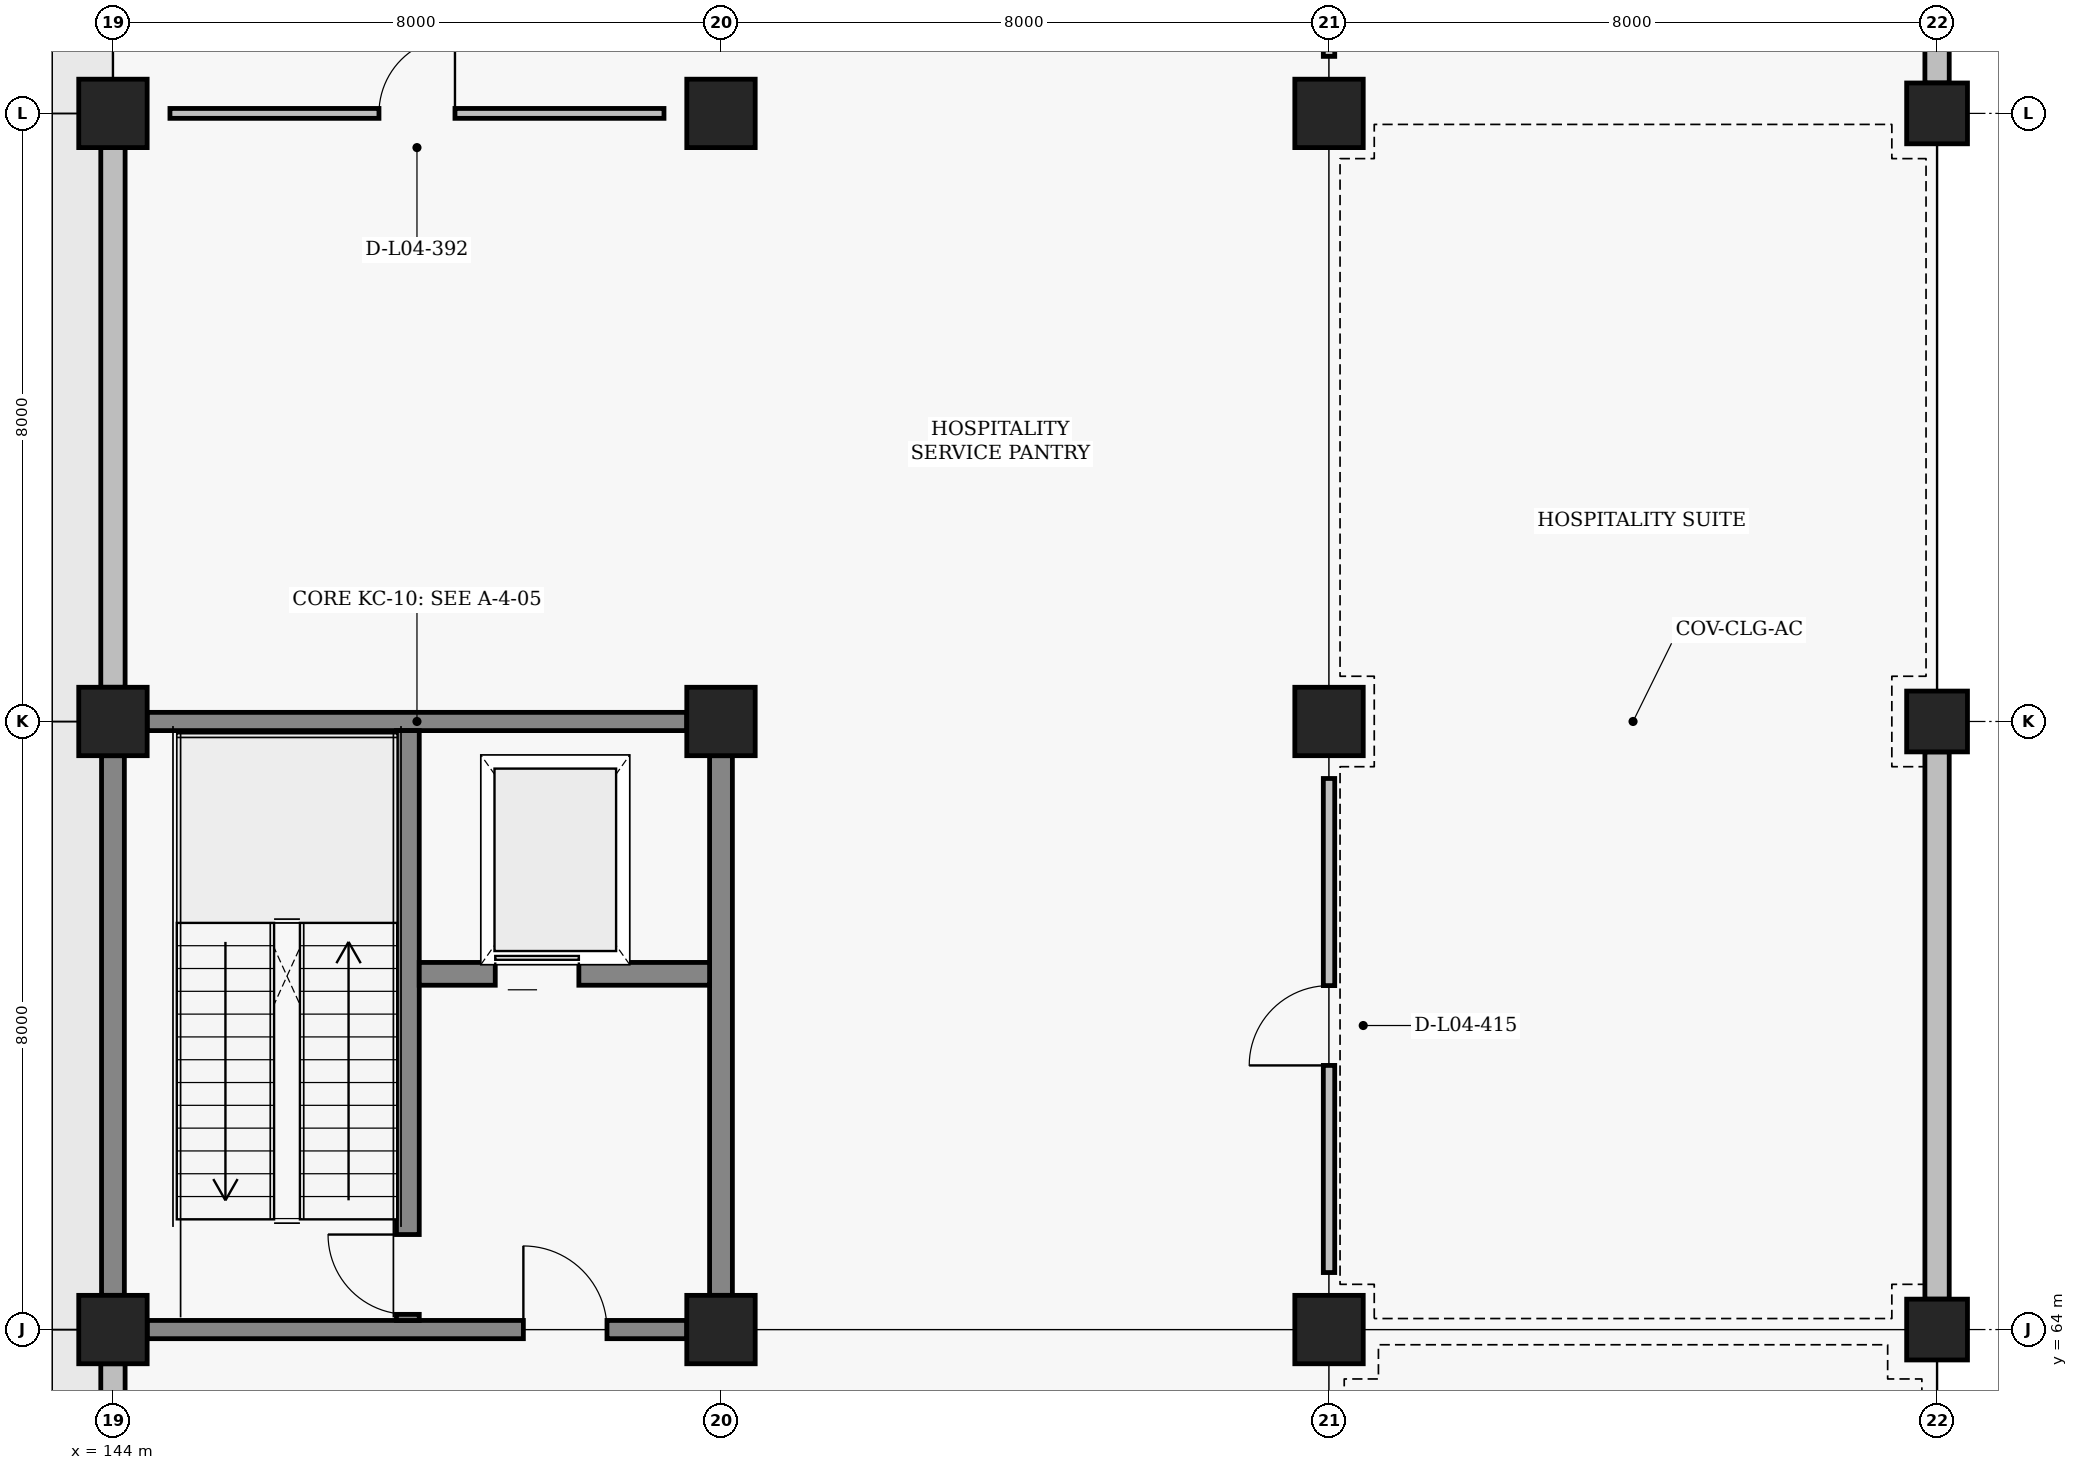
"""IFC4 building model, lengths in metres.
Left out: names, types, materials, properties, quantities, classifications, styles, units other than length and angle.
Written with IfcOpenShell. Run it as: python <this file> out.ifc"""

import sys

from ifc_helpers import new_model, si_unit, direction, frame, frame_2d, origin, origin_2d, place, context, subcontext, project, spatial, rectangle, extrude, element, fill, save


model = new_model("IFC4")
c1 = context("Model", 3, precision=1e-05, world=origin(), true_north=direction((0.0, 1.0)))
c2 = subcontext(c1, "Body", "Model", "MODEL_VIEW")
j1 = project(units=[si_unit("LENGTHUNIT", "METRE"), si_unit("PLANEANGLEUNIT", "RADIAN")], contexts=[c1])
p1 = place(None, origin())
s1 = spatial("IfcSite", under=j1, at=p1, CompositionType="ELEMENT")
p2 = place(p1, origin())
s2 = spatial("IfcBuilding", under=s1, at=p2, CompositionType="ELEMENT")
p3 = place(p2, frame((0.0, 0.0, 14.4)))
s3 = spatial("IfcBuildingStorey", under=s2, at=p3, CompositionType="ELEMENT", Elevation=14.4)
for number, where, z_axis, x_axis in (
    (1, (144.0, 64.0, 0.0), (0.0, 0.0, 1.0), (1.0, 0.0, 0.0)),
    (2, (144.0, 72.0, 0.0), (0.0, 0.0, 1.0), (1.0, 0.0, 0.0)),
    (3, (144.0, 80.0, 0.0), (0.0, 0.0, 1.0), (1.0, 0.0, 0.0)),
    (4, (152.0, 64.0, 0.0), (0.0, 0.0, 1.0), (1.0, 0.0, 0.0)),
    (5, (152.0, 72.0, 0.0), (0.0, 0.0, 1.0), (1.0, 0.0, 0.0)),
    (6, (152.0, 80.0, 0.0), (0.0, 0.0, 1.0), (1.0, 0.0, 0.0)),
    (7, (160.0, 64.0, 0.0), (0.0, 0.0, 1.0), (1.0, 0.0, 0.0)),
    (8, (160.0, 72.0, 0.0), (0.0, 0.0, 1.0), (1.0, 0.0, 0.0)),
    (9, (160.0, 80.0, 0.0), (0.0, 0.0, 1.0), (1.0, 0.0, 0.0)),
):
    element("IfcColumn", number, at=place(p3, frame(where, z_axis=z_axis, x_axis=x_axis)), inside=s3, PredefinedType="COLUMN", context=c2, shape_type="SweptSolid", body=[
        extrude(rectangle(XDim=0.9, YDim=0.9, at=origin_2d()), origin(), (0.0, 0.0, 1.0), 4.2),
    ])
for number, where, z_axis, x_axis in (
    (10, (168.0, 64.0, 0.0), (0.0, 0.0, 1.0), (1.0, 0.0, 0.0)),
    (11, (168.0, 72.0, 0.0), (0.0, 0.0, 1.0), (1.0, 0.0, 0.0)),
    (12, (168.0, 80.0, 0.0), (0.0, 0.0, 1.0), (1.0, 0.0, 0.0)),
):
    element("IfcColumn", number, at=place(p3, frame(where, z_axis=z_axis, x_axis=x_axis)), inside=s3, PredefinedType="COLUMN", context=c2, shape_type="SweptSolid", body=[
        extrude(rectangle(XDim=0.8, YDim=0.8, at=origin_2d()), origin(), (0.0, 0.0, 1.0), 4.2),
    ])
for number, where, z_axis, x_axis in (
    (13, (144.0, 56.45, 0.0), (0.0, 0.0, 1.0), (0.0, 1.0, 0.0)),
    (14, (144.0, 72.45, 0.0), (0.0, 0.0, 1.0), (0.0, 1.0, 0.0)),
):
    element("IfcWall", number, at=place(p3, frame(where, z_axis=z_axis, x_axis=x_axis)), inside=s3, PredefinedType="SOLIDWALL", context=c2, shape_type="SweptSolid", body=[
        extrude(rectangle(XDim=7.1, YDim=0.32, at=frame_2d((3.55, 0.0))), origin(), (0.0, 0.0, 1.0), 3.1),
    ])
for number, where, z_axis, x_axis in (
    (15, (168.0, 64.4, 0.0), (0.0, 0.0, 1.0), (0.0, 1.0, 0.0)),
    (16, (168.0, 80.4, 0.0), (0.0, 0.0, 1.0), (0.0, 1.0, 0.0)),
):
    element("IfcWall", number, at=place(p3, frame(where, z_axis=z_axis, x_axis=x_axis)), inside=s3, PredefinedType="SOLIDWALL", context=c2, shape_type="SweptSolid", body=[
        extrude(rectangle(XDim=7.2, YDim=0.32, at=frame_2d((3.6, 0.0))), origin(), (0.0, 0.0, 1.0), 3.35),
    ])
p4 = place(p3, frame((144.45, 64.0, 0.0), z_axis=(0.0, 0.0, 1.0), x_axis=(1.0, 0.0, 0.0)))
e17 = element("IfcWall", 17, at=p4, inside=s3, PredefinedType="SHEAR", context=c2, shape_type="SweptSolid", body=[
    extrude(rectangle(XDim=7.1, YDim=0.24, at=frame_2d((3.55, 0.0))), origin(), (0.0, 0.0, 1.0), 3.33),
])
p5 = place(p4, frame((4.95, 0.0, 0.0)))
e18 = element("IfcOpeningElement", 18, at=p5, cuts=e17, PredefinedType="OPENING", context=c2, shape_type="SweptSolid", body=[
    extrude(rectangle(XDim=1.1, YDim=2.2, at=frame_2d((0.55, 1.1))), frame((0.0, 0.13, 0.0), z_axis=(0.0, -1.0, 0.0), x_axis=(1.0, 0.0, 0.0)), (0.0, 0.0, 1.0), 0.26),
])
p6 = place(p3, frame((144.45, 72.0, 0.0), z_axis=(0.0, 0.0, 1.0), x_axis=(1.0, 0.0, 0.0)))
e19 = element("IfcWall", 19, at=p6, inside=s3, PredefinedType="SHEAR", context=c2, shape_type="SweptSolid", body=[
    extrude(rectangle(XDim=7.1, YDim=0.24, at=frame_2d((3.55, 0.0))), origin(), (0.0, 0.0, 1.0), 3.33),
])
p7 = place(p3, frame((144.0, 64.45, 0.0), z_axis=(0.0, 0.0, 1.0), x_axis=(0.0, 1.0, 0.0)))
e20 = element("IfcWall", 20, at=p7, inside=s3, PredefinedType="SHEAR", context=c2, shape_type="SweptSolid", body=[
    extrude(rectangle(XDim=7.1, YDim=0.3, at=frame_2d((3.55, 0.0))), origin(), (0.0, 0.0, 1.0), 3.1),
])
p8 = place(p3, frame((152.0, 64.45, 0.0), z_axis=(0.0, 0.0, 1.0), x_axis=(0.0, 1.0, 0.0)))
e21 = element("IfcWall", 21, at=p8, inside=s3, PredefinedType="SHEAR", context=c2, shape_type="SweptSolid", body=[
    extrude(rectangle(XDim=7.1, YDim=0.3, at=frame_2d((3.55, 0.0))), origin(), (0.0, 0.0, 1.0), 3.33),
])
p9 = place(p3, frame((147.88, 64.12, 0.0), z_axis=(0.0, 0.0, 1.0), x_axis=(0.0, 1.0, 0.0)))
e22 = element("IfcWall", 22, at=p9, inside=s3, PredefinedType="SHEAR", context=c2, shape_type="SweptSolid", body=[
    extrude(rectangle(XDim=7.76, YDim=0.3, at=frame_2d((3.88, 0.0))), origin(), (0.0, 0.0, 1.0), 3.43),
])
p10 = place(p9, frame((0.08, 0.0, 0.0)))
e23 = element("IfcOpeningElement", 23, at=p10, cuts=e22, PredefinedType="OPENING", context=c2, shape_type="SweptSolid", body=[
    extrude(rectangle(XDim=1.05, YDim=2.15, at=frame_2d((0.525, 1.075))), frame((0.0, 0.16, 0.0), z_axis=(0.0, -1.0, 0.0), x_axis=(1.0, 0.0, 0.0)), (0.0, 0.0, 1.0), 0.32),
])
p11 = place(p3, frame((148.03, 68.68, 0.0), z_axis=(0.0, 0.0, 1.0), x_axis=(1.0, 0.0, 0.0)))
e24 = element("IfcWall", 24, at=p11, inside=s3, PredefinedType="SHEAR", context=c2, shape_type="SweptSolid", body=[
    extrude(rectangle(XDim=3.82, YDim=0.3, at=frame_2d((1.91, 0.0))), origin(), (0.0, 0.0, 1.0), 3.33),
])
p12 = place(p11, frame((1.0, 0.0, 0.0)))
e25 = element("IfcOpeningElement", 25, at=p12, cuts=e24, PredefinedType="OPENING", context=c2, shape_type="SweptSolid", body=[
    extrude(rectangle(XDim=1.1, YDim=2.15, at=frame_2d((0.55, 1.075))), frame((0.0, 0.16, 0.0), z_axis=(0.0, -1.0, 0.0), x_axis=(1.0, 0.0, 0.0)), (0.0, 0.0, 1.0), 0.32),
])
p13 = place(p3, frame((144.75, 80.0, 0.0), z_axis=(0.0, 0.0, 1.0), x_axis=(1.0, 0.0, 0.0)))
e26 = element("IfcWall", 26, at=p13, inside=s3, PredefinedType="PARTITIONING", context=c2, shape_type="SweptSolid", body=[
    extrude(rectangle(XDim=6.5, YDim=0.13, at=frame_2d((3.25, 0.0))), origin(), (0.0, 0.0, 1.0), 3.43),
])
p14 = place(p13, frame((2.75, 0.0, 0.0)))
e27 = element("IfcOpeningElement", 27, at=p14, cuts=e26, PredefinedType="OPENING", context=c2, shape_type="SweptSolid", body=[
    extrude(rectangle(XDim=1.0, YDim=2.1, at=frame_2d((0.5, 1.05))), frame((0.0, 0.075, 0.0), z_axis=(0.0, -1.0, 0.0), x_axis=(1.0, 0.0, 0.0)), (0.0, 0.0, 1.0), 0.15),
])
p15 = place(p3, frame((160.0, 64.75, 0.0), z_axis=(0.0, 0.0, 1.0), x_axis=(0.0, 1.0, 0.0)))
e28 = element("IfcWall", 28, at=p15, inside=s3, PredefinedType="PARTITIONING", context=c2, shape_type="SweptSolid", body=[
    extrude(rectangle(XDim=6.5, YDim=0.15, at=frame_2d((3.25, 0.0))), origin(), (0.0, 0.0, 1.0), 3.33),
])
p16 = place(p15, frame((2.725, 0.0, 0.0)))
e29 = element("IfcOpeningElement", 29, at=p16, cuts=e28, PredefinedType="OPENING", context=c2, shape_type="SweptSolid", body=[
    extrude(rectangle(XDim=1.05, YDim=2.15, at=frame_2d((0.525, 1.075))), frame((0.0, 0.085, 0.0), z_axis=(0.0, -1.0, 0.0), x_axis=(1.0, 0.0, 0.0)), (0.0, 0.0, 1.0), 0.17),
])
p17 = place(p3, frame((160.0, 80.75, 0.0), z_axis=(0.0, 0.0, 1.0), x_axis=(0.0, 1.0, 0.0)))
e30 = element("IfcWall", 30, at=p17, inside=s3, PredefinedType="PARTITIONING", context=c2, shape_type="SweptSolid", body=[
    extrude(rectangle(XDim=6.5, YDim=0.15, at=frame_2d((3.25, 0.0))), origin(), (0.0, 0.0, 1.0), 3.33),
])
p18 = place(p17, frame((2.45, 0.0, 0.0)))
e31 = element("IfcOpeningElement", 31, at=p18, cuts=e30, PredefinedType="OPENING", context=c2, shape_type="SweptSolid", body=[
    extrude(rectangle(XDim=1.6, YDim=2.2, at=frame_2d((0.8, 1.1))), frame((0.0, 0.085, 0.0), z_axis=(0.0, -1.0, 0.0), x_axis=(1.0, 0.0, 0.0)), (0.0, 0.0, 1.0), 0.17),
])
p19 = place(p5, origin())
e32 = element("IfcDoor", 32, at=p19, inside=s3, OperationType="SINGLE_SWING_LEFT", PredefinedType="DOOR", context=c2, shape_type="SweptSolid", body=[
    extrude(rectangle(XDim=1.1, YDim=2.2, at=frame_2d((0.55, 1.1))), frame((0.0, 0.025, 0.0), z_axis=(0.0, -1.0, 0.0), x_axis=(1.0, 0.0, 0.0)), (0.0, 0.0, 1.0), 0.05),
])
fill(e18, e32)
p20 = place(p10, origin())
e33 = element("IfcDoor", 33, at=p20, inside=s3, OperationType="SINGLE_SWING_RIGHT", PredefinedType="DOOR", context=c2, shape_type="SweptSolid", body=[
    extrude(rectangle(XDim=1.05, YDim=2.15, at=frame_2d((0.525, 1.075))), frame((0.0, 0.025, 0.0), z_axis=(0.0, -1.0, 0.0), x_axis=(1.0, 0.0, 0.0)), (0.0, 0.0, 1.0), 0.05),
])
fill(e23, e33)
p21 = place(p12, origin())
e34 = element("IfcDoor", 34, at=p21, inside=s3, OperationType="SLIDING_TO_LEFT", PredefinedType="DOOR", context=c2, shape_type="SweptSolid", body=[
    extrude(rectangle(XDim=1.1, YDim=2.15, at=frame_2d((0.55, 1.075))), frame((0.0, 0.025, 0.0), z_axis=(0.0, -1.0, 0.0), x_axis=(1.0, 0.0, 0.0)), (0.0, 0.0, 1.0), 0.05),
])
fill(e25, e34)
p22 = place(p14, origin())
e35 = element("IfcDoor", 35, at=p22, inside=s3, OperationType="SINGLE_SWING_RIGHT", PredefinedType="DOOR", context=c2, shape_type="SweptSolid", body=[
    extrude(rectangle(XDim=1.0, YDim=2.1, at=frame_2d((0.5, 1.05))), frame((0.0, 0.025, 0.0), z_axis=(0.0, -1.0, 0.0), x_axis=(1.0, 0.0, 0.0)), (0.0, 0.0, 1.0), 0.05),
])
fill(e27, e35)
p23 = place(p16, origin())
e36 = element("IfcDoor", 36, at=p23, inside=s3, OperationType="SINGLE_SWING_LEFT", PredefinedType="DOOR", context=c2, shape_type="SweptSolid", body=[
    extrude(rectangle(XDim=1.05, YDim=2.15, at=frame_2d((0.525, 1.075))), frame((0.0, 0.025, 0.0), z_axis=(0.0, -1.0, 0.0), x_axis=(1.0, 0.0, 0.0)), (0.0, 0.0, 1.0), 0.05),
])
fill(e29, e36)
save(model, sys.argv[1])
